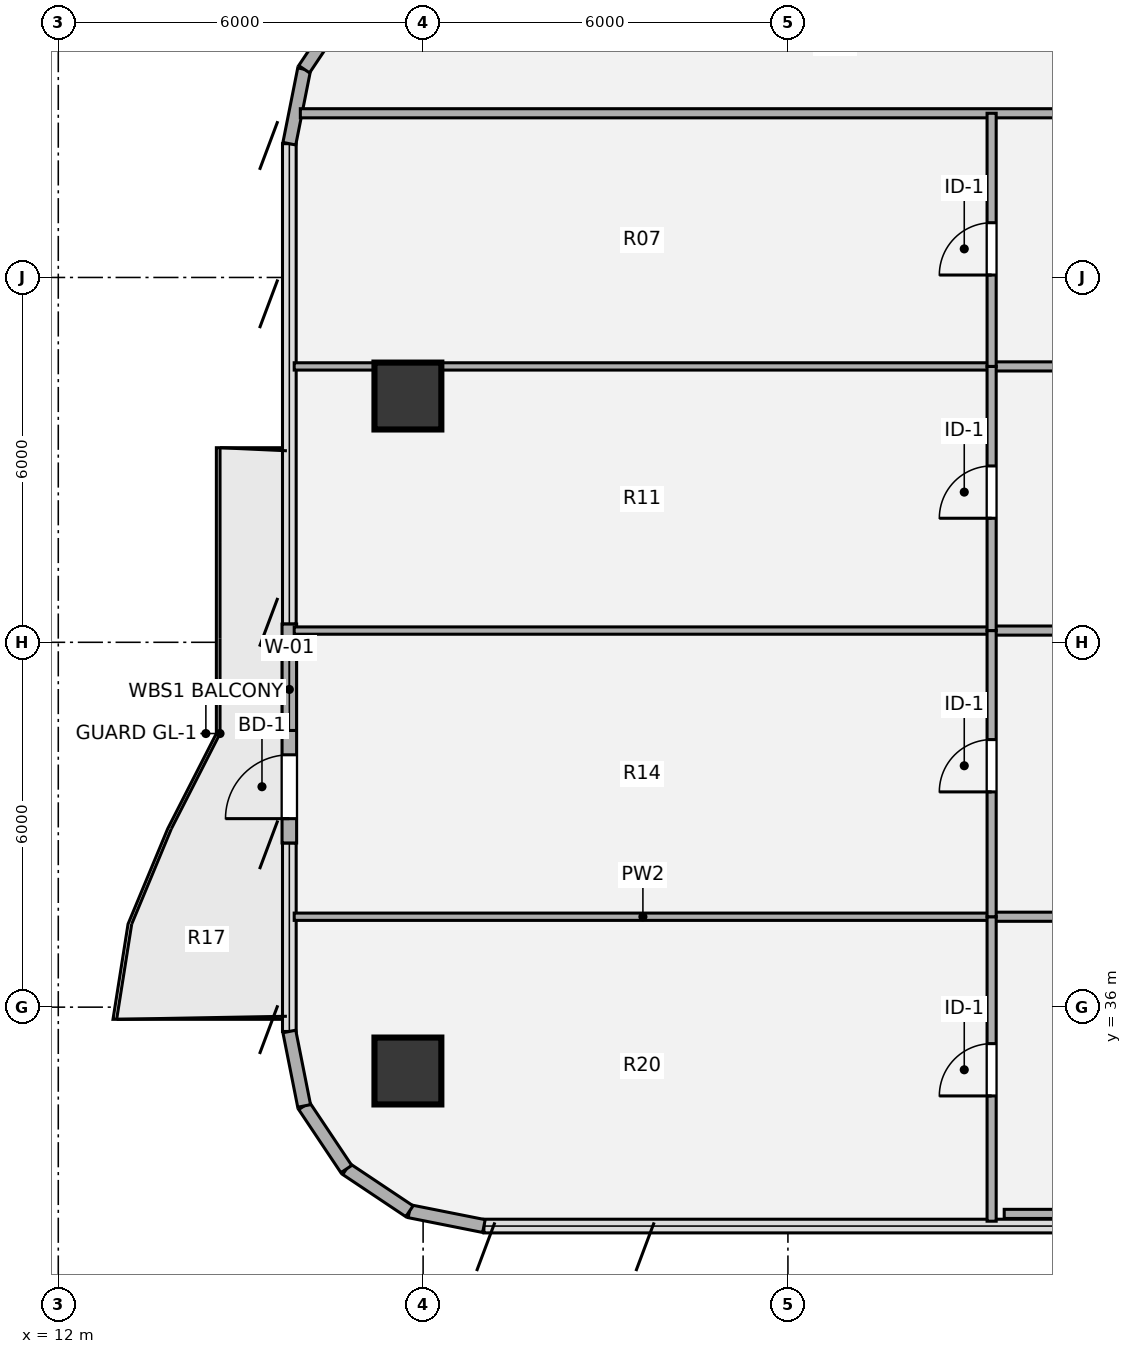
"""IFC4 building model, lengths in metres.
Left out: names, types, materials, properties, quantities, classifications, styles, units other than length and angle.
Written with IfcOpenShell. Run it as: python <this file> out.ifc"""

import sys

from ifc_helpers import new_model, si_unit, direction, frame, frame_2d, origin, origin_2d, place, context, subcontext, project, spatial, rectangle, hollow_circle, extrude, source, transform, mapped, element, fill, save


model = new_model("IFC4")
c1 = context("Model", 3, precision=1e-05, world=origin(), true_north=direction((0.0, 1.0)))
c2 = subcontext(c1, "Body", "Model", "MODEL_VIEW")
j1 = project(units=[si_unit("LENGTHUNIT", "METRE"), si_unit("PLANEANGLEUNIT", "RADIAN")], contexts=[c1])
p1 = place(None, origin())
s1 = spatial("IfcSite", under=j1, at=p1, CompositionType="ELEMENT")
p2 = place(p1, origin())
s2 = spatial("IfcBuilding", under=s1, at=p2, CompositionType="ELEMENT")
p3 = place(p2, frame((0.0, 0.0, 194.22)))
s3 = spatial("IfcBuildingStorey", under=s2, at=p3, CompositionType="ELEMENT", Elevation=194.22)
m1 = source(origin(), c2, "Body", "SweptSolid", [
    extrude(hollow_circle(Radius=0.55, WallThickness=0.04, at=origin_2d()), origin(), (0.0, 0.0, 1.0), 3.78),
])
for number, where, z_axis, x_axis in (
    (1, (17.75, 34.95, 0.0), (0.0, 0.0, 1.0), (1.0, 0.0, 0.0)),
    (2, (17.75, 46.05, 0.0), (0.0, 0.0, 1.0), (1.0, 0.0, 0.0)),
):
    element("IfcColumn", number, at=place(p3, frame(where, z_axis=z_axis, x_axis=x_axis)), inside=s3, PredefinedType="COLUMN", context=c2, shape_type="MappedRepresentation", body=[
        mapped(m1, transform((0.0, 0.0, 0.0), x_axis=(1.0, 0.0, 0.0), y_axis=(0.0, 1.0, 0.0), z_axis=(0.0, 0.0, 1.0), scale=1.0)),
    ])
for number, where, z_axis, x_axis in (
    (3, (19.0, 32.4, 0.0), (0.0, 0.0, 1.0), (-0.981, 0.195, 0.0)),
    (4, (17.775, 32.644, 0.0), (0.0, 0.0, 1.0), (-0.831, 0.556, 0.0)),
    (5, (16.737, 33.337, 0.0), (0.0, 0.0, 1.0), (-0.556, 0.831, 0.0)),
    (6, (16.044, 34.375, 0.0), (0.0, 0.0, 1.0), (-0.195, 0.981, 0.0)),
):
    element("IfcWall", number, at=place(p3, frame(where, z_axis=z_axis, x_axis=x_axis)), inside=s3, PredefinedType="SOLIDWALL", context=c2, shape_type="SweptSolid", body=[
        extrude(rectangle(XDim=1.249, YDim=0.215, at=frame_2d((0.624, 0.0))), origin(), (0.0, 0.0, 1.0), 3.53),
    ])
p4 = place(p3, frame((15.8, 38.7, 0.0), z_axis=(0.0, 0.0, 1.0), x_axis=(0.0, 1.0, 0.0)))
e7 = element("IfcWall", 7, at=p4, inside=s3, PredefinedType="SOLIDWALL", context=c2, shape_type="SweptSolid", body=[
    extrude(rectangle(XDim=3.6, YDim=0.24, at=frame_2d((1.8, 0.0))), origin(), (0.0, 0.0, 1.0), 3.53),
])
p5 = place(p4, frame((0.4, 0.0, 0.0)))
e8 = element("IfcOpeningElement", 8, at=p5, cuts=e7, PredefinedType="OPENING", context=c2, shape_type="SweptSolid", body=[
    extrude(rectangle(XDim=1.05, YDim=2.15, at=origin_2d()), frame((0.525, 0.13, 1.075), z_axis=(0.0, -1.0, 0.0), x_axis=(1.0, 0.0, 0.0)), (0.0, 0.0, 1.0), 0.26),
])
p6 = place(p4, frame((1.85, 0.0, 0.85)))
e9 = element("IfcOpeningElement", 9, at=p6, cuts=e7, PredefinedType="OPENING", context=c2, shape_type="SweptSolid", body=[
    extrude(rectangle(XDim=1.35, YDim=1.35, at=origin_2d()), frame((0.675, 0.13, 0.675), z_axis=(0.0, -1.0, 0.0), x_axis=(1.0, 0.0, 0.0)), (0.0, 0.0, 1.0), 0.26),
])
for number, where, z_axis, x_axis in (
    (10, (15.8, 50.2, 0.0), (0.0, 0.0, 1.0), (0.195, 0.981, 0.0)),
    (11, (16.044, 51.425, 0.0), (0.0, 0.0, 1.0), (0.556, 0.831, 0.0)),
):
    element("IfcWall", number, at=place(p3, frame(where, z_axis=z_axis, x_axis=x_axis)), inside=s3, PredefinedType="SOLIDWALL", context=c2, shape_type="SweptSolid", body=[
        extrude(rectangle(XDim=1.249, YDim=0.215, at=frame_2d((0.624, 0.0))), origin(), (0.0, 0.0, 1.0), 3.53),
    ])
p7 = place(p3, frame((27.557, 32.6, 0.0), z_axis=(0.0, 0.0, 1.0), x_axis=(1.0, 0.0, 0.0)))
e12 = element("IfcWall", 12, at=p7, inside=s3, PredefinedType="PARTITIONING", context=c2, shape_type="SweptSolid", body=[
    extrude(rectangle(XDim=5.993, YDim=0.15, at=frame_2d((2.997, 0.0))), origin(), (0.0, 0.0, 1.0), 3.5),
])
p8 = place(p3, frame((15.88, 37.487, 0.0), z_axis=(0.0, 0.0, 1.0), x_axis=(1.0, 0.0, 0.0)))
e13 = element("IfcWall", 13, at=p8, inside=s3, PredefinedType="PARTITIONING", context=c2, shape_type="SweptSolid", body=[
    extrude(rectangle(XDim=11.47, YDim=0.12, at=frame_2d((5.735, 0.0))), origin(), (0.0, 0.0, 1.0), 3.055),
])
p9 = place(p3, frame((27.35, 37.487, 0.0), z_axis=(0.0, 0.0, 1.0), x_axis=(1.0, 0.0, 0.0)))
e14 = element("IfcWall", 14, at=p9, inside=s3, PredefinedType="PARTITIONING", context=c2, shape_type="SweptSolid", body=[
    extrude(rectangle(XDim=6.2, YDim=0.15, at=frame_2d((3.1, 0.0))), origin(), (0.0, 0.0, 1.0), 3.055),
])
p10 = place(p3, frame((15.88, 42.193, 0.0), z_axis=(0.0, 0.0, 1.0), x_axis=(1.0, 0.0, 0.0)))
e15 = element("IfcWall", 15, at=p10, inside=s3, PredefinedType="PARTITIONING", context=c2, shape_type="SweptSolid", body=[
    extrude(rectangle(XDim=11.47, YDim=0.12, at=frame_2d((5.735, 0.0))), origin(), (0.0, 0.0, 1.0), 2.982),
])
p11 = place(p3, frame((27.35, 42.193, 0.0), z_axis=(0.0, 0.0, 1.0), x_axis=(1.0, 0.0, 0.0)))
e16 = element("IfcWall", 16, at=p11, inside=s3, PredefinedType="PARTITIONING", context=c2, shape_type="SweptSolid", body=[
    extrude(rectangle(XDim=6.2, YDim=0.15, at=frame_2d((3.1, 0.0))), origin(), (0.0, 0.0, 1.0), 2.982),
])
p12 = place(p3, frame((15.88, 46.537, 0.0), z_axis=(0.0, 0.0, 1.0), x_axis=(1.0, 0.0, 0.0)))
e17 = element("IfcWall", 17, at=p12, inside=s3, PredefinedType="PARTITIONING", context=c2, shape_type="SweptSolid", body=[
    extrude(rectangle(XDim=11.47, YDim=0.12, at=frame_2d((5.735, 0.0))), origin(), (0.0, 0.0, 1.0), 3.5),
])
p13 = place(p3, frame((27.35, 46.537, 0.0), z_axis=(0.0, 0.0, 1.0), x_axis=(1.0, 0.0, 0.0)))
e18 = element("IfcWall", 18, at=p13, inside=s3, PredefinedType="PARTITIONING", context=c2, shape_type="SweptSolid", body=[
    extrude(rectangle(XDim=6.2, YDim=0.15, at=frame_2d((3.1, 0.0))), origin(), (0.0, 0.0, 1.0), 3.259),
])
p14 = place(p3, frame((15.981, 50.7, 0.0), z_axis=(0.0, 0.0, 1.0), x_axis=(1.0, 0.0, 0.0)))
e19 = element("IfcWall", 19, at=p14, inside=s3, PredefinedType="PARTITIONING", context=c2, shape_type="SweptSolid", body=[
    extrude(rectangle(XDim=17.569, YDim=0.15, at=frame_2d((8.785, 0.0))), origin(), (0.0, 0.0, 1.0), 3.308),
])
p15 = place(p3, frame((27.35, 32.48, 0.0), z_axis=(0.0, 0.0, 1.0), x_axis=(0.0, 1.0, 0.0)))
e20 = element("IfcWall", 20, at=p15, inside=s3, PredefinedType="PARTITIONING", context=c2, shape_type="SweptSolid", body=[
    extrude(rectangle(XDim=5.007, YDim=0.15, at=frame_2d((2.503, 0.0))), origin(), (0.0, 0.0, 1.0), 3.5),
])
p16 = place(p15, frame((2.06, 0.0, 0.0)))
e21 = element("IfcOpeningElement", 21, at=p16, cuts=e20, PredefinedType="OPENING", context=c2, shape_type="SweptSolid", body=[
    extrude(rectangle(XDim=0.86, YDim=2.1, at=origin_2d()), frame((0.43, 0.085, 1.05), z_axis=(0.0, -1.0, 0.0), x_axis=(1.0, 0.0, 0.0)), (0.0, 0.0, 1.0), 0.17),
])
p17 = place(p3, frame((27.35, 37.487, 0.0), z_axis=(0.0, 0.0, 1.0), x_axis=(0.0, 1.0, 0.0)))
e22 = element("IfcWall", 22, at=p17, inside=s3, PredefinedType="PARTITIONING", context=c2, shape_type="SweptSolid", body=[
    extrude(rectangle(XDim=4.706, YDim=0.15, at=frame_2d((2.353, 0.0))), origin(), (0.0, 0.0, 1.0), 3.5),
])
p18 = place(p17, frame((2.053, 0.0, 0.0)))
e23 = element("IfcOpeningElement", 23, at=p18, cuts=e22, PredefinedType="OPENING", context=c2, shape_type="SweptSolid", body=[
    extrude(rectangle(XDim=0.86, YDim=2.1, at=origin_2d()), frame((0.43, 0.085, 1.05), z_axis=(0.0, -1.0, 0.0), x_axis=(1.0, 0.0, 0.0)), (0.0, 0.0, 1.0), 0.17),
])
p19 = place(p3, frame((27.35, 42.193, 0.0), z_axis=(0.0, 0.0, 1.0), x_axis=(0.0, 1.0, 0.0)))
e24 = element("IfcWall", 24, at=p19, inside=s3, PredefinedType="PARTITIONING", context=c2, shape_type="SweptSolid", body=[
    extrude(rectangle(XDim=4.344, YDim=0.15, at=frame_2d((2.172, 0.0))), origin(), (0.0, 0.0, 1.0), 3.5),
])
p20 = place(p19, frame((1.847, 0.0, 0.0)))
e25 = element("IfcOpeningElement", 25, at=p20, cuts=e24, PredefinedType="OPENING", context=c2, shape_type="SweptSolid", body=[
    extrude(rectangle(XDim=0.86, YDim=2.1, at=origin_2d()), frame((0.43, 0.085, 1.05), z_axis=(0.0, -1.0, 0.0), x_axis=(1.0, 0.0, 0.0)), (0.0, 0.0, 1.0), 0.17),
])
p21 = place(p3, frame((27.35, 46.537, 0.0), z_axis=(0.0, 0.0, 1.0), x_axis=(0.0, 1.0, 0.0)))
e26 = element("IfcWall", 26, at=p21, inside=s3, PredefinedType="PARTITIONING", context=c2, shape_type="SweptSolid", body=[
    extrude(rectangle(XDim=4.163, YDim=0.15, at=frame_2d((2.082, 0.0))), origin(), (0.0, 0.0, 1.0), 3.5),
])
p22 = place(p21, frame((1.503, 0.0, 0.0)))
e27 = element("IfcOpeningElement", 27, at=p22, cuts=e26, PredefinedType="OPENING", context=c2, shape_type="SweptSolid", body=[
    extrude(rectangle(XDim=0.86, YDim=2.1, at=origin_2d()), frame((0.43, 0.085, 1.05), z_axis=(0.0, -1.0, 0.0), x_axis=(1.0, 0.0, 0.0)), (0.0, 0.0, 1.0), 0.17),
])
m2 = source(origin(), c2, "Body", "SweptSolid", [
    extrude(rectangle(XDim=1.05, YDim=2.15, at=origin_2d()), frame((0.525, 0.025, 1.075), z_axis=(0.0, -1.0, 0.0), x_axis=(1.0, 0.0, 0.0)), (0.0, 0.0, 1.0), 0.05),
])
p23 = place(p5, origin())
e28 = element("IfcDoor", 28, at=p23, inside=s3, OperationType="SINGLE_SWING_LEFT", PredefinedType="DOOR", context=c2, shape_type="MappedRepresentation", body=[
    mapped(m2, transform((0.0, 0.0, 0.0), x_axis=(1.0, 0.0, 0.0), y_axis=(0.0, 1.0, 0.0), z_axis=(0.0, 0.0, 1.0), scale=1.0)),
])
fill(e8, e28)
m3 = source(origin(), c2, "Body", "SweptSolid", [
    extrude(rectangle(XDim=1.35, YDim=1.35, at=origin_2d()), frame((0.675, 0.03, 0.675), z_axis=(0.0, -1.0, 0.0), x_axis=(1.0, 0.0, 0.0)), (0.0, 0.0, 1.0), 0.06),
])
p24 = place(p6, origin())
e29 = element("IfcWindow", 29, at=p24, inside=s3, PartitioningType="SINGLE_PANEL", PredefinedType="WINDOW", context=c2, shape_type="MappedRepresentation", body=[
    mapped(m3, transform((0.0, 0.0, 0.0), x_axis=(1.0, 0.0, 0.0), y_axis=(0.0, 1.0, 0.0), z_axis=(0.0, 0.0, 1.0), scale=1.0)),
])
fill(e9, e29)
m4 = source(origin(), c2, "Body", "SweptSolid", [
    extrude(rectangle(XDim=0.86, YDim=2.1, at=origin_2d()), frame((0.43, 0.025, 1.05), z_axis=(0.0, -1.0, 0.0), x_axis=(1.0, 0.0, 0.0)), (0.0, 0.0, 1.0), 0.05),
])
p25 = place(p16, origin())
e30 = element("IfcDoor", 30, at=p25, inside=s3, OperationType="SINGLE_SWING_LEFT", PredefinedType="DOOR", context=c2, shape_type="MappedRepresentation", body=[
    mapped(m4, transform((0.0, 0.0, 0.0), x_axis=(1.0, 0.0, 0.0), y_axis=(0.0, 1.0, 0.0), z_axis=(0.0, 0.0, 1.0), scale=1.0)),
])
fill(e21, e30)
p26 = place(p18, origin())
e31 = element("IfcDoor", 31, at=p26, inside=s3, OperationType="SINGLE_SWING_LEFT", PredefinedType="DOOR", context=c2, shape_type="MappedRepresentation", body=[
    mapped(m4, transform((0.0, 0.0, 0.0), x_axis=(1.0, 0.0, 0.0), y_axis=(0.0, 1.0, 0.0), z_axis=(0.0, 0.0, 1.0), scale=1.0)),
])
fill(e23, e31)
p27 = place(p20, origin())
e32 = element("IfcDoor", 32, at=p27, inside=s3, OperationType="SINGLE_SWING_LEFT", PredefinedType="DOOR", context=c2, shape_type="MappedRepresentation", body=[
    mapped(m4, transform((0.0, 0.0, 0.0), x_axis=(1.0, 0.0, 0.0), y_axis=(0.0, 1.0, 0.0), z_axis=(0.0, 0.0, 1.0), scale=1.0)),
])
fill(e25, e32)
p28 = place(p22, origin())
e33 = element("IfcDoor", 33, at=p28, inside=s3, OperationType="SINGLE_SWING_LEFT", PredefinedType="DOOR", context=c2, shape_type="MappedRepresentation", body=[
    mapped(m4, transform((0.0, 0.0, 0.0), x_axis=(1.0, 0.0, 0.0), y_axis=(0.0, 1.0, 0.0), z_axis=(0.0, 0.0, 1.0), scale=1.0)),
])
fill(e27, e33)
save(model, sys.argv[1])
